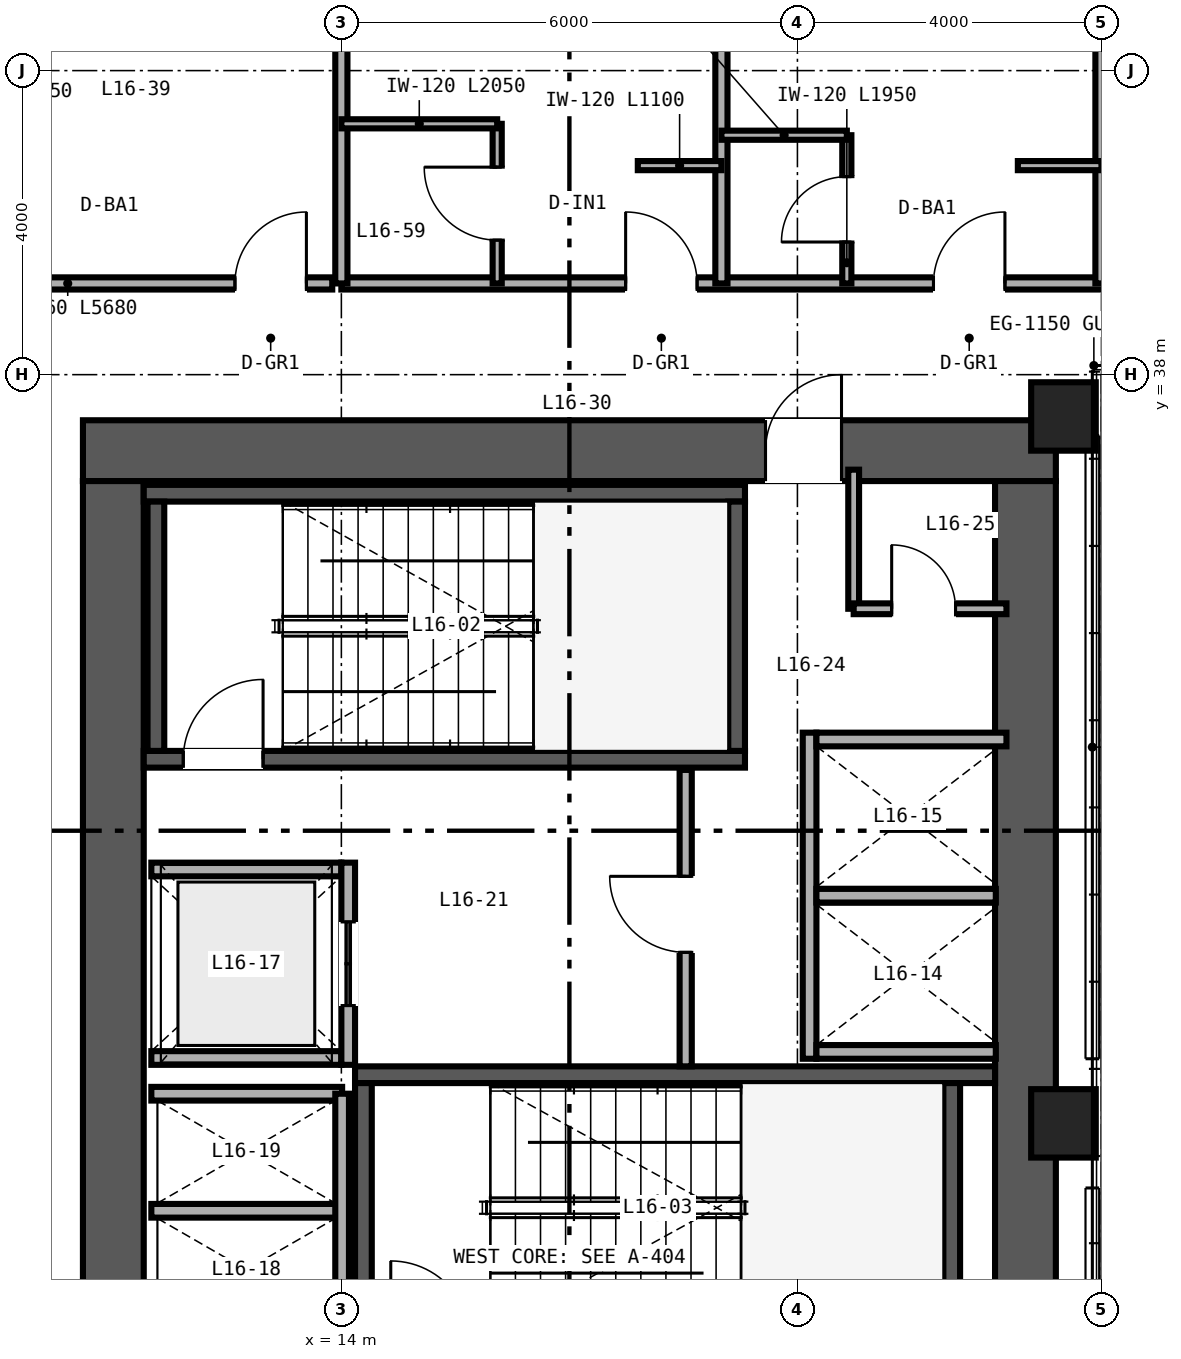
"""IFC4 building model, lengths in metres.
Left out: names, types, materials, properties, quantities, classifications, styles, units other than length and angle.
Written with IfcOpenShell. Run it as: python <this file> out.ifc"""

import sys

from ifc_helpers import new_model, si_unit, direction, frame, frame_2d, origin, origin_2d, place, context, subcontext, project, spatial, rectangle, hollow_rectangle, extrude, source, transform, mapped, element, fill, save


model = new_model("IFC4")
c1 = context("Model", 3, precision=1e-05, world=origin(), true_north=direction((0.0, 1.0)))
c2 = subcontext(c1, "Body", "Model", "MODEL_VIEW")
j1 = project(units=[si_unit("LENGTHUNIT", "METRE"), si_unit("PLANEANGLEUNIT", "RADIAN")], contexts=[c1])
p1 = place(None, origin())
s1 = spatial("IfcSite", under=j1, at=p1, CompositionType="ELEMENT")
p2 = place(p1, origin())
s2 = spatial("IfcBuilding", under=s1, at=p2, CompositionType="ELEMENT")
p3 = place(p2, frame((0.0, 0.0, 67.2)))
s3 = spatial("IfcBuildingStorey", under=s2, at=p3, CompositionType="ELEMENT", Elevation=67.2)
p4 = place(p3, frame((10.6, 37.0, 0.0), z_axis=(0.0, 0.0, 1.0), x_axis=(1.0, 0.0, 0.0)))
e1 = element("IfcWall", 1, at=p4, inside=s3, PredefinedType="SHEAR", context=c2, shape_type="SweptSolid", body=[
    extrude(rectangle(XDim=12.8, YDim=0.8, at=frame_2d((6.4, 0.0))), origin(), (0.0, 0.0, 1.0), 3.35),
])
p5 = place(p4, frame((8.98, 0.0, 0.0)))
e2 = element("IfcOpeningElement", 2, at=p5, cuts=e1, PredefinedType="OPENING", context=c2, shape_type="SweptSolid", body=[
    extrude(rectangle(XDim=1.0, YDim=2.15, at=frame_2d((0.5, 1.075))), frame((0.0, 0.41, 0.0), z_axis=(0.0, -1.0, 0.0), x_axis=(1.0, 0.0, 0.0)), (0.0, 0.0, 1.0), 0.82),
])
for number, where, z_axis, x_axis in (
    (3, (11.0, 15.4, 0.0), (0.0, 0.0, 1.0), (0.0, 1.0, 0.0)),
    (4, (23.0, 15.4, 0.0), (0.0, 0.0, 1.0), (0.0, 1.0, 0.0)),
):
    element("IfcWall", number, at=place(p3, frame(where, z_axis=z_axis, x_axis=x_axis)), inside=s3, PredefinedType="SHEAR", context=c2, shape_type="SweptSolid", body=[
        extrude(rectangle(XDim=21.2, YDim=0.8, at=frame_2d((10.6, 0.0))), origin(), (0.0, 0.0, 1.0), 3.35),
    ])
p6 = place(p3, frame((11.4, 32.94, 0.0), z_axis=(0.0, 0.0, 1.0), x_axis=(1.0, 0.0, 0.0)))
e5 = element("IfcWall", 5, at=p6, inside=s3, PredefinedType="SHEAR", context=c2, shape_type="SweptSolid", body=[
    extrude(rectangle(XDim=7.91, YDim=0.22, at=frame_2d((3.955, 0.0))), origin(), (0.0, 0.0, 1.0), 3.4),
])
p7 = place(p6, frame((0.52, 0.0, 0.0)))
e6 = element("IfcOpeningElement", 6, at=p7, cuts=e5, PredefinedType="OPENING", context=c2, shape_type="SweptSolid", body=[
    extrude(rectangle(XDim=1.05, YDim=2.15, at=frame_2d((0.525, 1.075))), frame((0.0, 0.12, 0.0), z_axis=(0.0, -1.0, 0.0), x_axis=(1.0, 0.0, 0.0)), (0.0, 0.0, 1.0), 0.24),
])
p8 = place(p3, frame((11.4, 36.44, 0.0), z_axis=(0.0, 0.0, 1.0), x_axis=(1.0, 0.0, 0.0)))
e7 = element("IfcWall", 7, at=p8, inside=s3, PredefinedType="SHEAR", context=c2, shape_type="SweptSolid", body=[
    extrude(rectangle(XDim=7.91, YDim=0.22, at=frame_2d((3.955, 0.0))), origin(), (0.0, 0.0, 1.0), 3.4),
])
for number, where, z_axis, x_axis in (
    (8, (11.56, 33.05, 0.0), (0.0, 0.0, 1.0), (0.0, 1.0, 0.0)),
    (9, (19.2, 33.05, 0.0), (0.0, 0.0, 1.0), (0.0, 1.0, 0.0)),
):
    element("IfcWall", number, at=place(p3, frame(where, z_axis=z_axis, x_axis=x_axis)), inside=s3, PredefinedType="SHEAR", context=c2, shape_type="SweptSolid", body=[
        extrude(rectangle(XDim=3.28, YDim=0.22, at=frame_2d((1.64, 0.0))), origin(), (0.0, 0.0, 1.0), 3.4),
    ])
p9 = place(p3, frame((14.18, 28.79, 0.0), z_axis=(0.0, 0.0, 1.0), x_axis=(1.0, 0.0, 0.0)))
e10 = element("IfcWall", 10, at=p9, inside=s3, PredefinedType="SHEAR", context=c2, shape_type="SweptSolid", body=[
    extrude(rectangle(XDim=8.42, YDim=0.22, at=frame_2d((4.21, 0.0))), origin(), (0.0, 0.0, 1.0), 3.4),
])
for number, where, z_axis, x_axis in (
    (11, (14.29, 25.4, 0.0), (0.0, 0.0, 1.0), (0.0, 1.0, 0.0)),
    (12, (22.03, 25.4, 0.0), (0.0, 0.0, 1.0), (0.0, 1.0, 0.0)),
):
    element("IfcWall", number, at=place(p3, frame(where, z_axis=z_axis, x_axis=x_axis)), inside=s3, PredefinedType="SHEAR", context=c2, shape_type="SweptSolid", body=[
        extrude(rectangle(XDim=3.28, YDim=0.22, at=frame_2d((1.64, 0.0))), origin(), (0.0, 0.0, 1.0), 3.4),
    ])
m1 = source(origin(), c2, "Body", "SweptSolid", [
    extrude(hollow_rectangle(XDim=0.85, YDim=0.9, WallThickness=0.04, at=origin_2d()), origin(), (0.0, 0.0, 1.0), 3.35),
])
for number, where, z_axis, x_axis in (
    (13, (23.5, 28.15, 0.0), (0.0, 0.0, 1.0), (1.0, 0.0, 0.0)),
    (14, (23.5, 37.45, 0.0), (0.0, 0.0, 1.0), (1.0, 0.0, 0.0)),
):
    element("IfcColumn", number, at=place(p3, frame(where, z_axis=z_axis, x_axis=x_axis)), inside=s3, PredefinedType="COLUMN", context=c2, shape_type="MappedRepresentation", body=[
        mapped(m1, transform((0.0, 0.0, 0.0), scale=1.0)),
    ])
p10 = place(p3, frame((20.16, 29.0, 0.0), z_axis=(0.0, 0.0, 1.0), x_axis=(0.0, 1.0, 0.0)))
e15 = element("IfcWall", 15, at=p10, inside=s3, PredefinedType="SOLIDWALL", context=c2, shape_type="SweptSolid", body=[
    extrude(rectangle(XDim=4.29, YDim=0.18, at=frame_2d((2.145, 0.0))), origin(), (0.0, 0.0, 1.0), 3.35),
])
p11 = place(p3, frame((20.25, 29.09, 0.0), z_axis=(0.0, 0.0, 1.0), x_axis=(1.0, 0.0, 0.0)))
e16 = element("IfcWall", 16, at=p11, inside=s3, PredefinedType="SOLIDWALL", context=c2, shape_type="SweptSolid", body=[
    extrude(rectangle(XDim=2.36, YDim=0.18, at=frame_2d((1.18, 0.0))), origin(), (0.0, 0.0, 1.0), 3.35),
])
p12 = place(p3, frame((20.25, 33.2, 0.0), z_axis=(0.0, 0.0, 1.0), x_axis=(1.0, 0.0, 0.0)))
e17 = element("IfcWall", 17, at=p12, inside=s3, PredefinedType="SOLIDWALL", context=c2, shape_type="SweptSolid", body=[
    extrude(rectangle(XDim=2.5, YDim=0.18, at=frame_2d((1.25, 0.0))), origin(), (0.0, 0.0, 1.0), 3.35),
])
p13 = place(p3, frame((20.25, 31.145, 0.0), z_axis=(0.0, 0.0, 1.0), x_axis=(1.0, 0.0, 0.0)))
e18 = element("IfcWall", 18, at=p13, inside=s3, PredefinedType="SOLIDWALL", context=c2, shape_type="SweptSolid", body=[
    extrude(rectangle(XDim=2.36, YDim=0.18, at=frame_2d((1.18, 0.0))), origin(), (0.0, 0.0, 1.0), 3.35),
])
for number, where, z_axis, x_axis in (
    (19, (11.5, 29.01, 0.0), (0.0, 0.0, 1.0), (1.0, 0.0, 0.0)),
    (20, (11.5, 31.49, 0.0), (0.0, 0.0, 1.0), (1.0, 0.0, 0.0)),
):
    element("IfcWall", number, at=place(p3, frame(where, z_axis=z_axis, x_axis=x_axis)), inside=s3, PredefinedType="SOLIDWALL", context=c2, shape_type="SweptSolid", body=[
        extrude(rectangle(XDim=2.5, YDim=0.18, at=frame_2d((1.25, 0.0))), origin(), (0.0, 0.0, 1.0), 3.35),
    ])
p14 = place(p3, frame((14.09, 28.92, 0.0), z_axis=(0.0, 0.0, 1.0), x_axis=(0.0, 1.0, 0.0)))
e21 = element("IfcWall", 21, at=p14, inside=s3, PredefinedType="SOLIDWALL", context=c2, shape_type="SweptSolid", body=[
    extrude(rectangle(XDim=2.66, YDim=0.18, at=frame_2d((1.33, 0.0))), origin(), (0.0, 0.0, 1.0), 3.35),
])
p15 = place(p14, frame((0.78, 0.0, 0.0)))
e22 = element("IfcOpeningElement", 22, at=p15, cuts=e21, PredefinedType="OPENING", context=c2, shape_type="SweptSolid", body=[
    extrude(rectangle(XDim=1.1, YDim=2.2, at=frame_2d((0.55, 1.1))), frame((0.0, 0.1, 0.0), z_axis=(0.0, -1.0, 0.0), x_axis=(1.0, 0.0, 0.0)), (0.0, 0.0, 1.0), 0.2),
])
for number, where, z_axis, x_axis in (
    (23, (11.5, 27.0, 0.0), (0.0, 0.0, 1.0), (1.0, 0.0, 0.0)),
    (24, (11.5, 28.54, 0.0), (0.0, 0.0, 1.0), (1.0, 0.0, 0.0)),
):
    element("IfcWall", number, at=place(p3, frame(where, z_axis=z_axis, x_axis=x_axis)), inside=s3, PredefinedType="SOLIDWALL", context=c2, shape_type="SweptSolid", body=[
        extrude(rectangle(XDim=2.51, YDim=0.18, at=frame_2d((1.255, 0.0))), origin(), (0.0, 0.0, 1.0), 3.35),
    ])
p16 = place(p3, frame((14.01, 25.46, 0.0), z_axis=(0.0, 0.0, 1.0), x_axis=(0.0, 1.0, 0.0)))
e25 = element("IfcWall", 25, at=p16, inside=s3, PredefinedType="SOLIDWALL", context=c2, shape_type="SweptSolid", body=[
    extrude(rectangle(XDim=3.08, YDim=0.18, at=frame_2d((1.54, 0.0))), origin(), (0.0, 0.0, 1.0), 3.35),
])
p17 = place(p3, frame((18.53, 28.9, 0.0), z_axis=(0.0, 0.0, 1.0), x_axis=(0.0, 1.0, 0.0)))
e26 = element("IfcWall", 26, at=p17, inside=s3, PredefinedType="PARTITIONING", context=c2, shape_type="SweptSolid", body=[
    extrude(rectangle(XDim=3.9, YDim=0.16, at=frame_2d((1.95, 0.0))), origin(), (0.0, 0.0, 1.0), 3.35),
])
p18 = place(p17, frame((1.5, 0.0, 0.0)))
e27 = element("IfcOpeningElement", 27, at=p18, cuts=e26, PredefinedType="OPENING", context=c2, shape_type="SweptSolid", body=[
    extrude(rectangle(XDim=1.0, YDim=2.15, at=frame_2d((0.5, 1.075))), frame((0.0, 0.09, 0.0), z_axis=(0.0, -1.0, 0.0), x_axis=(1.0, 0.0, 0.0)), (0.0, 0.0, 1.0), 0.18),
])
p19 = place(p3, frame((20.74, 34.92, 0.0), z_axis=(0.0, 0.0, 1.0), x_axis=(0.0, 1.0, 0.0)))
e28 = element("IfcWall", 28, at=p19, inside=s3, PredefinedType="PARTITIONING", context=c2, shape_type="SweptSolid", body=[
    extrude(rectangle(XDim=1.83, YDim=0.142, at=frame_2d((0.915, 0.0))), origin(), (0.0, 0.0, 1.0), 3.35),
])
p20 = place(p3, frame((20.74, 34.92, 0.0), z_axis=(0.0, 0.0, 1.0), x_axis=(1.0, 0.0, 0.0)))
e29 = element("IfcWall", 29, at=p20, inside=s3, PredefinedType="PARTITIONING", context=c2, shape_type="SweptSolid", body=[
    extrude(rectangle(XDim=2.01, YDim=0.142, at=frame_2d((1.005, 0.0))), origin(), (0.0, 0.0, 1.0), 3.35),
])
p21 = place(p20, frame((0.5, 0.0, 0.0)))
e30 = element("IfcOpeningElement", 30, at=p21, cuts=e29, PredefinedType="OPENING", context=c2, shape_type="SweptSolid", body=[
    extrude(rectangle(XDim=0.84, YDim=2.1, at=frame_2d((0.42, 1.05))), frame((0.0, 0.081, 0.0), z_axis=(0.0, -1.0, 0.0), x_axis=(1.0, 0.0, 0.0)), (0.0, 0.0, 1.0), 0.162),
])
p22 = place(p3, frame((8.2, 39.2, 0.0), z_axis=(0.0, 0.0, 1.0), x_axis=(1.0, 0.0, 0.0)))
e31 = element("IfcWall", 31, at=p22, inside=s3, PredefinedType="PARTITIONING", context=c2, shape_type="SweptSolid", body=[
    extrude(rectangle(XDim=5.68, YDim=0.16, at=frame_2d((2.84, 0.0))), origin(), (0.0, 0.0, 1.0), 3.35),
])
p23 = place(p22, frame((4.4, 0.0, 0.0)))
e32 = element("IfcOpeningElement", 32, at=p23, cuts=e31, PredefinedType="OPENING", context=c2, shape_type="SweptSolid", body=[
    extrude(rectangle(XDim=0.94, YDim=2.15, at=frame_2d((0.47, 1.075))), frame((0.0, 0.09, 0.0), z_axis=(0.0, -1.0, 0.0), x_axis=(1.0, 0.0, 0.0)), (0.0, 0.0, 1.0), 0.18),
])
p24 = place(p3, frame((14.0, 39.2, 0.0), z_axis=(0.0, 0.0, 1.0), x_axis=(1.0, 0.0, 0.0)))
e33 = element("IfcWall", 33, at=p24, inside=s3, PredefinedType="PARTITIONING", context=c2, shape_type="SweptSolid", body=[
    extrude(rectangle(XDim=36.0, YDim=0.16, at=frame_2d((18.0, 0.0))), origin(), (0.0, 0.0, 1.0), 2.571),
])
p25 = place(p24, frame((3.74, 0.0, 0.0)))
e34 = element("IfcOpeningElement", 34, at=p25, cuts=e33, PredefinedType="OPENING", context=c2, shape_type="SweptSolid", body=[
    extrude(rectangle(XDim=0.94, YDim=2.15, at=frame_2d((0.47, 1.075))), frame((0.0, 0.09, 0.0), z_axis=(0.0, -1.0, 0.0), x_axis=(1.0, 0.0, 0.0)), (0.0, 0.0, 1.0), 0.18),
])
p26 = place(p24, frame((7.79, 0.0, 0.0)))
e35 = element("IfcOpeningElement", 35, at=p26, cuts=e33, PredefinedType="OPENING", context=c2, shape_type="SweptSolid", body=[
    extrude(rectangle(XDim=0.94, YDim=2.15, at=frame_2d((0.47, 1.075))), frame((0.0, 0.09, 0.0), z_axis=(0.0, -1.0, 0.0), x_axis=(1.0, 0.0, 0.0)), (0.0, 0.0, 1.0), 0.18),
])
p27 = place(p24, frame((12.22, 0.0, 0.0)))
e36 = element("IfcOpeningElement", 36, at=p27, cuts=e33, PredefinedType="OPENING", context=c2, shape_type="SweptSolid", body=[
    extrude(rectangle(XDim=0.96, YDim=2.15, at=frame_2d((0.48, 1.075))), frame((0.0, 0.09, 0.0), z_axis=(0.0, -1.0, 0.0), x_axis=(1.0, 0.0, 0.0)), (0.0, 0.0, 1.0), 0.18),
])
p28 = place(p24, frame((19.94, 0.0, 0.0)))
e37 = element("IfcOpeningElement", 37, at=p28, cuts=e33, PredefinedType="OPENING", context=c2, shape_type="SweptSolid", body=[
    extrude(rectangle(XDim=0.94, YDim=2.15, at=frame_2d((0.47, 1.075))), frame((0.0, 0.09, 0.0), z_axis=(0.0, -1.0, 0.0), x_axis=(1.0, 0.0, 0.0)), (0.0, 0.0, 1.0), 0.18),
])
p29 = place(p24, frame((24.84, 0.0, 0.0)))
e38 = element("IfcOpeningElement", 38, at=p29, cuts=e33, PredefinedType="OPENING", context=c2, shape_type="SweptSolid", body=[
    extrude(rectangle(XDim=0.94, YDim=2.15, at=frame_2d((0.47, 1.075))), frame((0.0, 0.09, 0.0), z_axis=(0.0, -1.0, 0.0), x_axis=(1.0, 0.0, 0.0)), (0.0, 0.0, 1.0), 0.18),
])
p30 = place(p24, frame((29.94, 0.0, 0.0)))
e39 = element("IfcOpeningElement", 39, at=p30, cuts=e33, PredefinedType="OPENING", context=c2, shape_type="SweptSolid", body=[
    extrude(rectangle(XDim=0.94, YDim=2.15, at=frame_2d((0.47, 1.075))), frame((0.0, 0.09, 0.0), z_axis=(0.0, -1.0, 0.0), x_axis=(1.0, 0.0, 0.0)), (0.0, 0.0, 1.0), 0.18),
])
p31 = place(p24, frame((33.12, 0.0, 0.0)))
e40 = element("IfcOpeningElement", 40, at=p31, cuts=e33, PredefinedType="OPENING", context=c2, shape_type="SweptSolid", body=[
    extrude(rectangle(XDim=0.96, YDim=2.15, at=frame_2d((0.48, 1.075))), frame((0.0, 0.09, 0.0), z_axis=(0.0, -1.0, 0.0), x_axis=(1.0, 0.0, 0.0)), (0.0, 0.0, 1.0), 0.18),
])
for number, where, z_axis, x_axis in (
    (41, (14.0, 39.2, 0.0), (0.0, 0.0, 1.0), (0.0, 1.0, 0.0)),
    (42, (19.0, 39.2, 0.0), (0.0, 0.0, 1.0), (0.0, 1.0, 0.0)),
):
    element("IfcWall", number, at=place(p3, frame(where, z_axis=z_axis, x_axis=x_axis)), inside=s3, PredefinedType="PARTITIONING", context=c2, shape_type="SweptSolid", body=[
        extrude(rectangle(XDim=10.44, YDim=0.16, at=frame_2d((5.22, 0.0))), origin(), (0.0, 0.0, 1.0), 2.657),
    ])
p32 = place(p3, frame((16.05, 39.2, 0.0), z_axis=(0.0, 0.0, 1.0), x_axis=(0.0, 1.0, 0.0)))
e43 = element("IfcWall", 43, at=p32, inside=s3, PredefinedType="PARTITIONING", context=c2, shape_type="SweptSolid", body=[
    extrude(rectangle(XDim=2.1, YDim=0.12, at=frame_2d((1.05, 0.0))), origin(), (0.0, 0.0, 1.0), 3.35),
])
p33 = place(p32, frame((0.57, 0.0, 0.0)))
e44 = element("IfcOpeningElement", 44, at=p33, cuts=e43, PredefinedType="OPENING", context=c2, shape_type="SweptSolid", body=[
    extrude(rectangle(XDim=0.96, YDim=2.15, at=frame_2d((0.48, 1.075))), frame((0.0, 0.07, 0.0), z_axis=(0.0, -1.0, 0.0), x_axis=(1.0, 0.0, 0.0)), (0.0, 0.0, 1.0), 0.14),
])
p34 = place(p3, frame((14.0, 41.3, 0.0), z_axis=(0.0, 0.0, 1.0), x_axis=(1.0, 0.0, 0.0)))
e45 = element("IfcWall", 45, at=p34, inside=s3, PredefinedType="PARTITIONING", context=c2, shape_type="SweptSolid", body=[
    extrude(rectangle(XDim=2.05, YDim=0.12, at=frame_2d((1.025, 0.0))), origin(), (0.0, 0.0, 1.0), 3.35),
])
p35 = place(p3, frame((17.9, 40.75, 0.0), z_axis=(0.0, 0.0, 1.0), x_axis=(1.0, 0.0, 0.0)))
e46 = element("IfcWall", 46, at=p35, inside=s3, PredefinedType="PARTITIONING", context=c2, shape_type="SweptSolid", body=[
    extrude(rectangle(XDim=1.1, YDim=0.12, at=frame_2d((0.55, 0.0))), origin(), (0.0, 0.0, 1.0), 3.35),
])
p36 = place(p3, frame((24.0, 39.2, 0.0), z_axis=(0.0, 0.0, 1.0), x_axis=(0.0, 1.0, 0.0)))
e47 = element("IfcWall", 47, at=p36, inside=s3, PredefinedType="PARTITIONING", context=c2, shape_type="SweptSolid", body=[
    extrude(rectangle(XDim=10.44, YDim=0.16, at=frame_2d((5.22, 0.0))), origin(), (0.0, 0.0, 1.0), 2.423),
])
p37 = place(p3, frame((20.65, 39.2, 0.0), z_axis=(0.0, 0.0, 1.0), x_axis=(0.0, 1.0, 0.0)))
e48 = element("IfcWall", 48, at=p37, inside=s3, PredefinedType="PARTITIONING", context=c2, shape_type="SweptSolid", body=[
    extrude(rectangle(XDim=1.95, YDim=0.12, at=frame_2d((0.975, 0.0))), origin(), (0.0, 0.0, 1.0), 3.35),
])
p38 = place(p37, frame((0.545, 0.0, 0.0)))
e49 = element("IfcOpeningElement", 49, at=p38, cuts=e48, PredefinedType="OPENING", context=c2, shape_type="SweptSolid", body=[
    extrude(rectangle(XDim=0.86, YDim=2.1, at=frame_2d((0.43, 1.05))), frame((0.0, 0.07, 0.0), z_axis=(0.0, -1.0, 0.0), x_axis=(1.0, 0.0, 0.0)), (0.0, 0.0, 1.0), 0.14),
])
p39 = place(p3, frame((19.0, 41.15, 0.0), z_axis=(0.0, 0.0, 1.0), x_axis=(1.0, 0.0, 0.0)))
e50 = element("IfcWall", 50, at=p39, inside=s3, PredefinedType="PARTITIONING", context=c2, shape_type="SweptSolid", body=[
    extrude(rectangle(XDim=1.65, YDim=0.12, at=frame_2d((0.825, 0.0))), origin(), (0.0, 0.0, 1.0), 3.35),
])
p40 = place(p3, frame((22.9, 40.75, 0.0), z_axis=(0.0, 0.0, 1.0), x_axis=(1.0, 0.0, 0.0)))
e51 = element("IfcWall", 51, at=p40, inside=s3, PredefinedType="PARTITIONING", context=c2, shape_type="SweptSolid", body=[
    extrude(rectangle(XDim=1.1, YDim=0.12, at=frame_2d((0.55, 0.0))), origin(), (0.0, 0.0, 1.0), 2.571),
])
m2 = source(origin(), c2, "Body", "SweptSolid", [
    extrude(rectangle(XDim=1.05, YDim=2.15, at=frame_2d((0.525, 1.075))), frame((0.0, 0.025, 0.0), z_axis=(0.0, -1.0, 0.0), x_axis=(1.0, 0.0, 0.0)), (0.0, 0.0, 1.0), 0.05),
])
p41 = place(p7, origin())
e52 = element("IfcDoor", 52, at=p41, inside=s3, OperationType="SINGLE_SWING_RIGHT", PredefinedType="DOOR", context=c2, shape_type="MappedRepresentation", body=[
    mapped(m2, transform((0.0, 0.0, 0.0), scale=1.0)),
])
fill(e6, e52)
m3 = source(origin(), c2, "Body", "SweptSolid", [
    extrude(rectangle(XDim=1.1, YDim=2.2, at=frame_2d((0.55, 1.1))), frame((0.0, 0.025, 0.0), z_axis=(0.0, -1.0, 0.0), x_axis=(1.0, 0.0, 0.0)), (0.0, 0.0, 1.0), 0.05),
])
p42 = place(p15, origin())
e53 = element("IfcDoor", 53, at=p42, inside=s3, OperationType="DOUBLE_DOOR_SLIDING", PredefinedType="DOOR", context=c2, shape_type="MappedRepresentation", body=[
    mapped(m3, transform((0.0, 0.0, 0.0), scale=1.0)),
])
fill(e22, e53)
m4 = source(origin(), c2, "Body", "SweptSolid", [
    extrude(rectangle(XDim=1.0, YDim=2.15, at=frame_2d((0.5, 1.075))), frame((0.0, 0.025, 0.0), z_axis=(0.0, -1.0, 0.0), x_axis=(1.0, 0.0, 0.0)), (0.0, 0.0, 1.0), 0.05),
])
p43 = place(p18, origin())
e54 = element("IfcDoor", 54, at=p43, inside=s3, OperationType="SINGLE_SWING_RIGHT", PredefinedType="DOOR", context=c2, shape_type="MappedRepresentation", body=[
    mapped(m4, transform((0.0, 0.0, 0.0), scale=1.0)),
])
fill(e27, e54)
m5 = source(origin(), c2, "Body", "SweptSolid", [
    extrude(rectangle(XDim=0.84, YDim=2.1, at=frame_2d((0.42, 1.05))), frame((0.0, 0.025, 0.0), z_axis=(0.0, -1.0, 0.0), x_axis=(1.0, 0.0, 0.0)), (0.0, 0.0, 1.0), 0.05),
])
p44 = place(p21, origin())
e55 = element("IfcDoor", 55, at=p44, inside=s3, OperationType="SINGLE_SWING_LEFT", PredefinedType="DOOR", context=c2, shape_type="MappedRepresentation", body=[
    mapped(m5, transform((0.0, 0.0, 0.0), scale=1.0)),
])
fill(e30, e55)
p45 = place(p5, origin())
e56 = element("IfcDoor", 56, at=p45, inside=s3, OperationType="SINGLE_SWING_RIGHT", PredefinedType="DOOR", context=c2, shape_type="MappedRepresentation", body=[
    mapped(m4, transform((0.0, 0.0, 0.0), scale=1.0)),
])
fill(e2, e56)
m6 = source(origin(), c2, "Body", "SweptSolid", [
    extrude(rectangle(XDim=0.94, YDim=2.15, at=frame_2d((0.47, 1.075))), frame((0.0, 0.025, 0.0), z_axis=(0.0, -1.0, 0.0), x_axis=(1.0, 0.0, 0.0)), (0.0, 0.0, 1.0), 0.05),
])
p46 = place(p23, origin())
e57 = element("IfcDoor", 57, at=p46, inside=s3, OperationType="SINGLE_SWING_RIGHT", PredefinedType="DOOR", context=c2, shape_type="MappedRepresentation", body=[
    mapped(m6, transform((0.0, 0.0, 0.0), scale=1.0)),
])
fill(e32, e57)
m7 = source(origin(), c2, "Body", "SweptSolid", [
    extrude(rectangle(XDim=0.96, YDim=2.15, at=frame_2d((0.48, 1.075))), frame((0.0, 0.025, 0.0), z_axis=(0.0, -1.0, 0.0), x_axis=(1.0, 0.0, 0.0)), (0.0, 0.0, 1.0), 0.05),
])
p47 = place(p33, origin())
e58 = element("IfcDoor", 58, at=p47, inside=s3, OperationType="SINGLE_SWING_RIGHT", PredefinedType="DOOR", context=c2, shape_type="MappedRepresentation", body=[
    mapped(m7, transform((0.0, 0.0, 0.0), scale=1.0)),
])
fill(e44, e58)
m8 = source(origin(), c2, "Body", "SweptSolid", [
    extrude(rectangle(XDim=0.86, YDim=2.1, at=frame_2d((0.43, 1.05))), frame((0.0, 0.025, 0.0), z_axis=(0.0, -1.0, 0.0), x_axis=(1.0, 0.0, 0.0)), (0.0, 0.0, 1.0), 0.05),
])
p48 = place(p38, origin())
e59 = element("IfcDoor", 59, at=p48, inside=s3, OperationType="SINGLE_SWING_LEFT", PredefinedType="DOOR", context=c2, shape_type="MappedRepresentation", body=[
    mapped(m8, transform((0.0, 0.0, 0.0), scale=1.0)),
])
fill(e49, e59)
p49 = place(p25, origin())
e60 = element("IfcDoor", 60, at=p49, inside=s3, OperationType="SINGLE_SWING_LEFT", PredefinedType="DOOR", context=c2, shape_type="MappedRepresentation", body=[
    mapped(m6, transform((0.0, 0.0, 0.0), scale=1.0)),
])
fill(e34, e60)
p50 = place(p26, origin())
e61 = element("IfcDoor", 61, at=p50, inside=s3, OperationType="SINGLE_SWING_RIGHT", PredefinedType="DOOR", context=c2, shape_type="MappedRepresentation", body=[
    mapped(m6, transform((0.0, 0.0, 0.0), scale=1.0)),
])
fill(e35, e61)
save(model, sys.argv[1])
